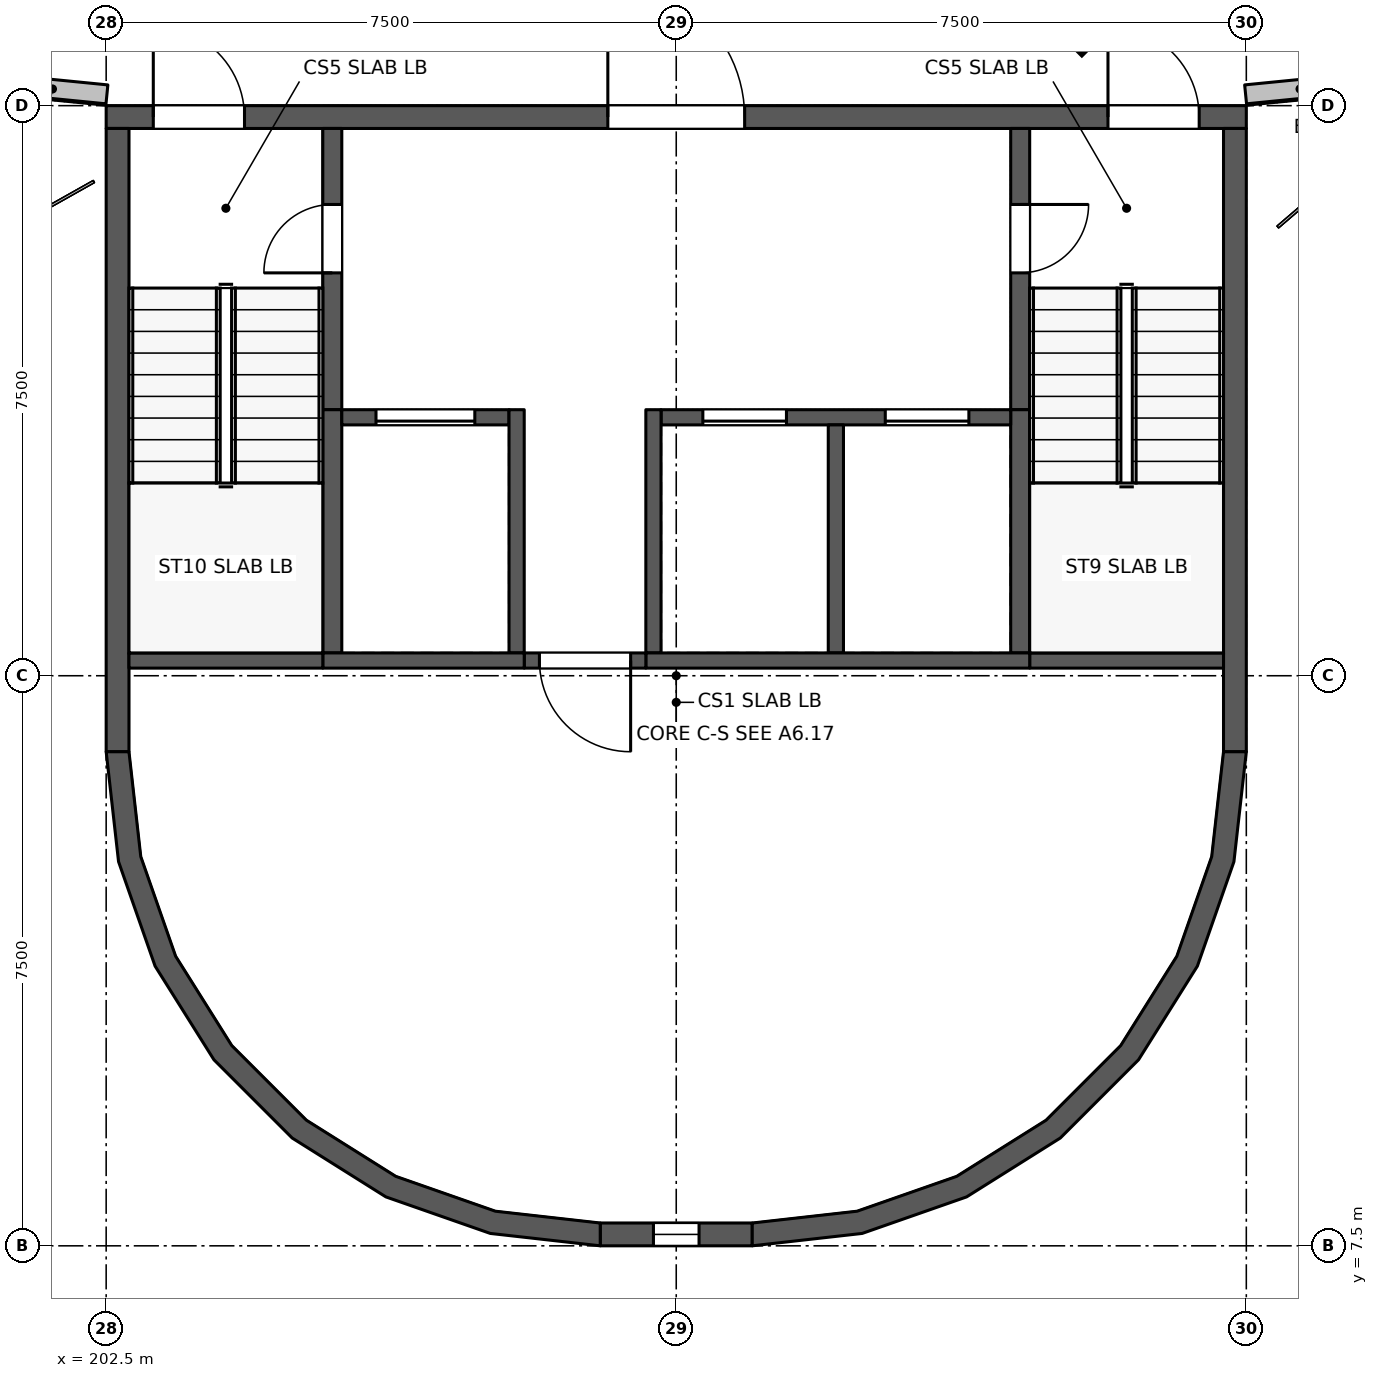
"""IFC4 building model, lengths in metres.
Left out: names, types, materials, properties, quantities, classifications, styles, units other than length and angle.
Written with IfcOpenShell. Run it as: python <this file> out.ifc"""

import sys

from ifc_helpers import new_model, si_unit, direction, frame, frame_2d, origin, place, context, subcontext, project, spatial, polyline, rectangle, outline, extrude, element, fill, save


model = new_model("IFC4")
c1 = context("Model", 3, precision=1e-05, world=origin(), true_north=direction((0.0, 1.0)))
c2 = subcontext(c1, "Body", "Model", "MODEL_VIEW")
j1 = project(units=[si_unit("LENGTHUNIT", "METRE"), si_unit("PLANEANGLEUNIT", "RADIAN")], contexts=[c1])
p1 = place(None, origin())
s1 = spatial("IfcSite", under=j1, at=p1, CompositionType="ELEMENT")
p2 = place(p1, origin())
s2 = spatial("IfcBuilding", under=s1, at=p2, CompositionType="ELEMENT")
p3 = place(p2, frame((0.0, 0.0, 9.9)))
s3 = spatial("IfcBuildingStorey", under=s2, at=p3, CompositionType="ELEMENT", Elevation=9.9)
p4 = place(p3, frame((201.077, 22.79, 0.0), z_axis=(0.0, 0.0, 1.0), x_axis=(0.995137391066, -0.098496562898, 0.0)))
e1 = element("IfcWall", 1, at=p4, inside=s3, PredefinedType="SOLIDWALL", context=c2, shape_type="SweptSolid", body=[
    extrude(rectangle(XDim=1.44, YDim=0.25, at=frame_2d((0.72, 0.0))), origin(), (0.0, 0.0, 1.0), 1.1),
])
p5 = place(p3, frame((217.49, 22.648, 0.0), z_axis=(0.0, 0.0, 1.0), x_axis=(0.995122410186, 0.098647801521, 0.0)))
e2 = element("IfcWall", 2, at=p5, inside=s3, PredefinedType="SOLIDWALL", context=c2, shape_type="SweptSolid", body=[
    extrude(rectangle(XDim=1.44, YDim=0.25, at=frame_2d((0.72, 0.0))), origin(), (0.0, 0.0, 1.0), 1.1),
])
p6 = place(p3, frame((202.5, 22.35, 0.0), z_axis=(0.0, 0.0, 1.0), x_axis=(1.0, 0.0, 0.0)))
e3 = element("IfcWall", 3, at=p6, inside=s3, PredefinedType="SHEAR", context=c2, shape_type="SweptSolid", body=[
    extrude(rectangle(XDim=15.0, YDim=0.3, at=frame_2d((7.5, 0.0))), origin(), (0.0, 0.0, 1.0), 3.3),
])
p7 = place(p6, frame((13.18, 0.0, 0.0)))
e4 = element("IfcOpeningElement", 4, at=p7, cuts=e3, PredefinedType="OPENING", context=c2, shape_type="SweptSolid", body=[
    extrude(rectangle(XDim=1.2, YDim=2.1, at=frame_2d((0.6, 1.05))), frame((0.0, 0.16, 0.0), z_axis=(0.0, -1.0, 0.0), x_axis=(1.0, 0.0, 0.0)), (0.0, 0.0, 1.0), 0.32),
])
p8 = place(p6, frame((0.62, 0.0, 0.0)))
e5 = element("IfcOpeningElement", 5, at=p8, cuts=e3, PredefinedType="OPENING", context=c2, shape_type="SweptSolid", body=[
    extrude(rectangle(XDim=1.2, YDim=2.1, at=frame_2d((0.6, 1.05))), frame((0.0, 0.16, 0.0), z_axis=(0.0, -1.0, 0.0), x_axis=(1.0, 0.0, 0.0)), (0.0, 0.0, 1.0), 0.32),
])
p9 = place(p6, frame((6.6, 0.0, 0.0)))
e6 = element("IfcOpeningElement", 6, at=p9, cuts=e3, PredefinedType="OPENING", context=c2, shape_type="SweptSolid", body=[
    extrude(rectangle(XDim=1.8, YDim=2.1, at=frame_2d((0.9, 1.05))), frame((0.0, 0.16, 0.0), z_axis=(0.0, -1.0, 0.0), x_axis=(1.0, 0.0, 0.0)), (0.0, 0.0, 1.0), 0.32),
])
p10 = place(p3, frame((211.0, 7.65, 0.0), z_axis=(0.0, 0.0, 1.0), x_axis=(-1.0, 0.0, 0.0)))
e7 = element("IfcWall", 7, at=p10, inside=s3, PredefinedType="SHEAR", context=c2, shape_type="SweptSolid", body=[
    extrude(rectangle(XDim=2.0, YDim=0.3, at=frame_2d((1.0, 0.0))), origin(), (0.0, 0.0, 1.0), 3.3),
])
p11 = place(p10, frame((0.7, 0.0, 0.3)))
e8 = element("IfcOpeningElement", 8, at=p11, cuts=e7, PredefinedType="OPENING", context=c2, shape_type="SweptSolid", body=[
    extrude(rectangle(XDim=0.6, YDim=2.7, at=frame_2d((0.3, 1.35))), frame((0.0, 0.16, 0.0), z_axis=(0.0, -1.0, 0.0), x_axis=(1.0, 0.0, 0.0)), (0.0, 0.0, 1.0), 0.32),
])
for number, where, z_axis, x_axis in (
    (9, (217.35, 22.2, 0.0), (0.0, 0.0, 1.0), (0.0, -1.0, 0.0)),
    (10, (202.65, 14.0, 0.0), (0.0, 0.0, 1.0), (0.0, 1.0, 0.0)),
):
    element("IfcWall", number, at=place(p3, frame(where, z_axis=z_axis, x_axis=x_axis)), inside=s3, PredefinedType="SHEAR", context=c2, shape_type="SweptSolid", body=[
        extrude(rectangle(XDim=8.2, YDim=0.3, at=frame_2d((4.1, 0.0))), origin(), (0.0, 0.0, 1.0), 3.3),
    ])
p12 = place(p3, frame((214.525, 22.2, 0.0), z_axis=(0.0, 0.0, 1.0), x_axis=(0.0, -1.0, 0.0)))
e11 = element("IfcWall", 11, at=p12, inside=s3, PredefinedType="STANDARD", context=c2, shape_type="SweptSolid", body=[
    extrude(rectangle(XDim=3.7, YDim=0.25, at=frame_2d((1.85, 0.0))), origin(), (0.0, 0.0, 1.0), 3.1),
])
p13 = place(p12, frame((1.0, 0.0, 0.0)))
e12 = element("IfcOpeningElement", 12, at=p13, cuts=e11, PredefinedType="OPENING", context=c2, shape_type="SweptSolid", body=[
    extrude(rectangle(XDim=0.9, YDim=2.1, at=frame_2d((0.45, 1.05))), frame((0.0, 0.135, 0.0), z_axis=(0.0, -1.0, 0.0), x_axis=(1.0, 0.0, 0.0)), (0.0, 0.0, 1.0), 0.27),
])
p14 = place(p3, frame((214.525, 18.5, 0.0), z_axis=(0.0, 0.0, 1.0), x_axis=(0.0, -1.0, 0.0)))
e13 = element("IfcWall", 13, at=p14, inside=s3, PredefinedType="STANDARD", context=c2, shape_type="SweptSolid", body=[
    extrude(rectangle(XDim=3.2, YDim=0.25, at=frame_2d((1.6, 0.0))), origin(), (0.0, 0.0, 1.0), 3.1),
])
p15 = place(p3, frame((205.475, 18.5, 0.0), z_axis=(0.0, 0.0, 1.0), x_axis=(0.0, 1.0, 0.0)))
e14 = element("IfcWall", 14, at=p15, inside=s3, PredefinedType="STANDARD", context=c2, shape_type="SweptSolid", body=[
    extrude(rectangle(XDim=3.7, YDim=0.25, at=frame_2d((1.85, 0.0))), origin(), (0.0, 0.0, 1.0), 3.1),
])
p16 = place(p15, frame((1.8, 0.0, 0.0)))
e15 = element("IfcOpeningElement", 15, at=p16, cuts=e14, PredefinedType="OPENING", context=c2, shape_type="SweptSolid", body=[
    extrude(rectangle(XDim=0.9, YDim=2.1, at=frame_2d((0.45, 1.05))), frame((0.0, 0.135, 0.0), z_axis=(0.0, -1.0, 0.0), x_axis=(1.0, 0.0, 0.0)), (0.0, 0.0, 1.0), 0.27),
])
p17 = place(p3, frame((205.475, 18.5, 0.0), z_axis=(0.0, 0.0, 1.0), x_axis=(0.0, -1.0, 0.0)))
e16 = element("IfcWall", 16, at=p17, inside=s3, PredefinedType="STANDARD", context=c2, shape_type="SweptSolid", body=[
    extrude(rectangle(XDim=3.2, YDim=0.25, at=frame_2d((1.6, 0.0))), origin(), (0.0, 0.0, 1.0), 3.1),
])
p18 = place(p3, frame((214.4, 18.4, 0.0), z_axis=(0.0, 0.0, 1.0), x_axis=(-1.0, 0.0, 0.0)))
e17 = element("IfcWall", 17, at=p18, inside=s3, PredefinedType="STANDARD", context=c2, shape_type="SweptSolid", body=[
    extrude(rectangle(XDim=4.6, YDim=0.2, at=frame_2d((2.3, 0.0))), origin(), (0.0, 0.0, 1.0), 3.1),
])
p19 = place(p18, frame((0.55, 0.0, 0.0)))
e18 = element("IfcOpeningElement", 18, at=p19, cuts=e17, PredefinedType="OPENING", context=c2, shape_type="SweptSolid", body=[
    extrude(rectangle(XDim=1.1, YDim=2.1, at=frame_2d((0.55, 1.05))), frame((0.0, 0.11, 0.0), z_axis=(0.0, -1.0, 0.0), x_axis=(1.0, 0.0, 0.0)), (0.0, 0.0, 1.0), 0.22),
])
p20 = place(p18, frame((2.95, 0.0, 0.0)))
e19 = element("IfcOpeningElement", 19, at=p20, cuts=e17, PredefinedType="OPENING", context=c2, shape_type="SweptSolid", body=[
    extrude(rectangle(XDim=1.1, YDim=2.1, at=frame_2d((0.55, 1.05))), frame((0.0, 0.11, 0.0), z_axis=(0.0, -1.0, 0.0), x_axis=(1.0, 0.0, 0.0)), (0.0, 0.0, 1.0), 0.22),
])
p21 = place(p3, frame((207.8, 18.4, 0.0), z_axis=(0.0, 0.0, 1.0), x_axis=(-1.0, 0.0, 0.0)))
e20 = element("IfcWall", 20, at=p21, inside=s3, PredefinedType="STANDARD", context=c2, shape_type="SweptSolid", body=[
    extrude(rectangle(XDim=2.2, YDim=0.2, at=frame_2d((1.1, 0.0))), origin(), (0.0, 0.0, 1.0), 3.1),
])
p22 = place(p21, frame((0.45, 0.0, 0.0)))
e21 = element("IfcOpeningElement", 21, at=p22, cuts=e20, PredefinedType="OPENING", context=c2, shape_type="SweptSolid", body=[
    extrude(rectangle(XDim=1.3, YDim=2.1, at=frame_2d((0.65, 1.05))), frame((0.0, 0.11, 0.0), z_axis=(0.0, -1.0, 0.0), x_axis=(1.0, 0.0, 0.0)), (0.0, 0.0, 1.0), 0.22),
])
p23 = place(p3, frame((212.1, 18.3, 0.0), z_axis=(0.0, 0.0, 1.0), x_axis=(0.0, -1.0, 0.0)))
e22 = element("IfcWall", 22, at=p23, inside=s3, PredefinedType="STANDARD", context=c2, shape_type="SweptSolid", body=[
    extrude(rectangle(XDim=3.0, YDim=0.2, at=frame_2d((1.5, 0.0))), origin(), (0.0, 0.0, 1.0), 3.1),
])
for number, where, z_axis, x_axis in (
    (23, (209.7, 18.5, 0.0), (0.0, 0.0, 1.0), (0.0, -1.0, 0.0)),
    (24, (207.9, 18.5, 0.0), (0.0, 0.0, 1.0), (0.0, -1.0, 0.0)),
):
    element("IfcWall", number, at=place(p3, frame(where, z_axis=z_axis, x_axis=x_axis)), inside=s3, PredefinedType="STANDARD", context=c2, shape_type="SweptSolid", body=[
        extrude(rectangle(XDim=3.2, YDim=0.2, at=frame_2d((1.6, 0.0))), origin(), (0.0, 0.0, 1.0), 3.1),
    ])
p24 = place(p3, frame((217.2, 15.2, 0.0), z_axis=(0.0, 0.0, 1.0), x_axis=(-1.0, 0.0, 0.0)))
e25 = element("IfcWall", 25, at=p24, inside=s3, PredefinedType="STANDARD", context=c2, shape_type="SweptSolid", body=[
    extrude(rectangle(XDim=2.55, YDim=0.2, at=frame_2d((1.275, 0.0))), origin(), (0.0, 0.0, 1.0), 3.1),
])
p25 = place(p3, frame((214.65, 15.2, 0.0), z_axis=(0.0, 0.0, 1.0), x_axis=(-1.0, 0.0, 0.0)))
e26 = element("IfcWall", 26, at=p25, inside=s3, PredefinedType="STANDARD", context=c2, shape_type="SweptSolid", body=[
    extrude(rectangle(XDim=5.05, YDim=0.2, at=frame_2d((2.525, 0.0))), origin(), (0.0, 0.0, 1.0), 3.1),
])
p26 = place(p3, frame((209.6, 15.2, 0.0), z_axis=(0.0, 0.0, 1.0), x_axis=(-1.0, 0.0, 0.0)))
e27 = element("IfcWall", 27, at=p26, inside=s3, PredefinedType="STANDARD", context=c2, shape_type="SweptSolid", body=[
    extrude(rectangle(XDim=1.6, YDim=0.2, at=frame_2d((0.8, 0.0))), origin(), (0.0, 0.0, 1.0), 3.1),
])
p27 = place(p26, frame((0.2, 0.0, 0.0)))
e28 = element("IfcOpeningElement", 28, at=p27, cuts=e27, PredefinedType="OPENING", context=c2, shape_type="SweptSolid", body=[
    extrude(rectangle(XDim=1.2, YDim=2.1, at=frame_2d((0.6, 1.05))), frame((0.0, 0.11, 0.0), z_axis=(0.0, -1.0, 0.0), x_axis=(1.0, 0.0, 0.0)), (0.0, 0.0, 1.0), 0.22),
])
p28 = place(p3, frame((208.0, 15.2, 0.0), z_axis=(0.0, 0.0, 1.0), x_axis=(-1.0, 0.0, 0.0)))
e29 = element("IfcWall", 29, at=p28, inside=s3, PredefinedType="STANDARD", context=c2, shape_type="SweptSolid", body=[
    extrude(rectangle(XDim=2.65, YDim=0.2, at=frame_2d((1.325, 0.0))), origin(), (0.0, 0.0, 1.0), 3.1),
])
p29 = place(p3, frame((205.35, 15.2, 0.0), z_axis=(0.0, 0.0, 1.0), x_axis=(-1.0, 0.0, 0.0)))
e30 = element("IfcWall", 30, at=p29, inside=s3, PredefinedType="STANDARD", context=c2, shape_type="SweptSolid", body=[
    extrude(rectangle(XDim=2.55, YDim=0.2, at=frame_2d((1.275, 0.0))), origin(), (0.0, 0.0, 1.0), 3.1),
])
p30 = place(p3, origin())
e31 = element("IfcWall", 31, at=p30, inside=s3, PredefinedType="SHEAR", context=c2, shape_type="SweptSolid", body=[
    extrude(outline(polyline([(217.5, 14.0), (217.337, 12.554), (216.856, 11.18), (216.082, 9.947), (215.053, 8.918), (213.82, 8.144), (212.446, 7.663), (211.0, 7.5), (211.0, 7.8), (212.38, 7.955), (213.69, 8.414), (214.865, 9.153), (215.847, 10.135), (216.586, 11.31), (217.045, 12.62), (217.2, 14.0), (217.5, 14.0)])), origin(), (0.0, 0.0, 1.0), 3.3),
])
p31 = place(p3, origin())
e32 = element("IfcWall", 32, at=p31, inside=s3, PredefinedType="SHEAR", context=c2, shape_type="SweptSolid", body=[
    extrude(outline(polyline([(202.5, 14.0), (202.663, 12.554), (203.144, 11.18), (203.918, 9.947), (204.947, 8.918), (206.18, 8.144), (207.554, 7.663), (209.0, 7.5), (209.0, 7.8), (207.62, 7.955), (206.31, 8.414), (205.135, 9.153), (204.153, 10.135), (203.414, 11.31), (202.955, 12.62), (202.8, 14.0), (202.5, 14.0)])), origin(), (0.0, 0.0, 1.0), 3.3),
])
p32 = place(p7, origin())
e33 = element("IfcDoor", 33, at=p32, inside=s3, OperationType="SINGLE_SWING_RIGHT", PredefinedType="DOOR", context=c2, shape_type="SweptSolid", body=[
    extrude(rectangle(XDim=1.2, YDim=2.1, at=frame_2d((0.6, 1.05))), frame((0.0, 0.025, 0.0), z_axis=(0.0, -1.0, 0.0), x_axis=(1.0, 0.0, 0.0)), (0.0, 0.0, 1.0), 0.05),
])
fill(e4, e33)
p33 = place(p8, origin())
e34 = element("IfcDoor", 34, at=p33, inside=s3, OperationType="SINGLE_SWING_LEFT", PredefinedType="DOOR", context=c2, shape_type="SweptSolid", body=[
    extrude(rectangle(XDim=1.2, YDim=2.1, at=frame_2d((0.6, 1.05))), frame((0.0, 0.025, 0.0), z_axis=(0.0, -1.0, 0.0), x_axis=(1.0, 0.0, 0.0)), (0.0, 0.0, 1.0), 0.05),
])
fill(e5, e34)
p34 = place(p9, origin())
e35 = element("IfcDoor", 35, at=p34, inside=s3, OperationType="DOUBLE_DOOR_SINGLE_SWING", PredefinedType="DOOR", context=c2, shape_type="SweptSolid", body=[
    extrude(rectangle(XDim=1.8, YDim=2.1, at=frame_2d((0.9, 1.05))), frame((0.0, 0.025, 0.0), z_axis=(0.0, -1.0, 0.0), x_axis=(1.0, 0.0, 0.0)), (0.0, 0.0, 1.0), 0.05),
])
fill(e6, e35)
p35 = place(p13, origin())
e36 = element("IfcDoor", 36, at=p35, inside=s3, OperationType="SINGLE_SWING_LEFT", PredefinedType="DOOR", context=c2, shape_type="SweptSolid", body=[
    extrude(rectangle(XDim=0.9, YDim=2.1, at=frame_2d((0.45, 1.05))), frame((0.0, 0.025, 0.0), z_axis=(0.0, -1.0, 0.0), x_axis=(1.0, 0.0, 0.0)), (0.0, 0.0, 1.0), 0.05),
])
fill(e12, e36)
p36 = place(p16, origin())
e37 = element("IfcDoor", 37, at=p36, inside=s3, OperationType="SINGLE_SWING_RIGHT", PredefinedType="DOOR", context=c2, shape_type="SweptSolid", body=[
    extrude(rectangle(XDim=0.9, YDim=2.1, at=frame_2d((0.45, 1.05))), frame((0.0, 0.025, 0.0), z_axis=(0.0, -1.0, 0.0), x_axis=(1.0, 0.0, 0.0)), (0.0, 0.0, 1.0), 0.05),
])
fill(e15, e37)
p37 = place(p19, origin())
e38 = element("IfcDoor", 38, at=p37, inside=s3, OperationType="DOUBLE_DOOR_SLIDING", PredefinedType="DOOR", context=c2, shape_type="SweptSolid", body=[
    extrude(rectangle(XDim=1.1, YDim=2.1, at=frame_2d((0.55, 1.05))), frame((0.0, 0.025, 0.0), z_axis=(0.0, -1.0, 0.0), x_axis=(1.0, 0.0, 0.0)), (0.0, 0.0, 1.0), 0.05),
])
fill(e18, e38)
p38 = place(p20, origin())
e39 = element("IfcDoor", 39, at=p38, inside=s3, OperationType="DOUBLE_DOOR_SLIDING", PredefinedType="DOOR", context=c2, shape_type="SweptSolid", body=[
    extrude(rectangle(XDim=1.1, YDim=2.1, at=frame_2d((0.55, 1.05))), frame((0.0, 0.025, 0.0), z_axis=(0.0, -1.0, 0.0), x_axis=(1.0, 0.0, 0.0)), (0.0, 0.0, 1.0), 0.05),
])
fill(e19, e39)
p39 = place(p22, origin())
e40 = element("IfcDoor", 40, at=p39, inside=s3, OperationType="DOUBLE_DOOR_SLIDING", PredefinedType="DOOR", context=c2, shape_type="SweptSolid", body=[
    extrude(rectangle(XDim=1.3, YDim=2.1, at=frame_2d((0.65, 1.05))), frame((0.0, 0.025, 0.0), z_axis=(0.0, -1.0, 0.0), x_axis=(1.0, 0.0, 0.0)), (0.0, 0.0, 1.0), 0.05),
])
fill(e21, e40)
p40 = place(p27, origin())
e41 = element("IfcDoor", 41, at=p40, inside=s3, OperationType="SINGLE_SWING_RIGHT", PredefinedType="DOOR", context=c2, shape_type="SweptSolid", body=[
    extrude(rectangle(XDim=1.2, YDim=2.1, at=frame_2d((0.6, 1.05))), frame((0.0, 0.025, 0.0), z_axis=(0.0, -1.0, 0.0), x_axis=(1.0, 0.0, 0.0)), (0.0, 0.0, 1.0), 0.05),
])
fill(e28, e41)
p41 = place(p11, origin())
e42 = element("IfcWindow", 42, at=p41, inside=s3, PartitioningType="SINGLE_PANEL", PredefinedType="WINDOW", context=c2, shape_type="SweptSolid", body=[
    extrude(rectangle(XDim=0.6, YDim=2.7, at=frame_2d((0.3, 1.35))), frame((0.0, 0.03, 0.0), z_axis=(0.0, -1.0, 0.0), x_axis=(1.0, 0.0, 0.0)), (0.0, 0.0, 1.0), 0.06),
])
fill(e8, e42)
save(model, sys.argv[1])
